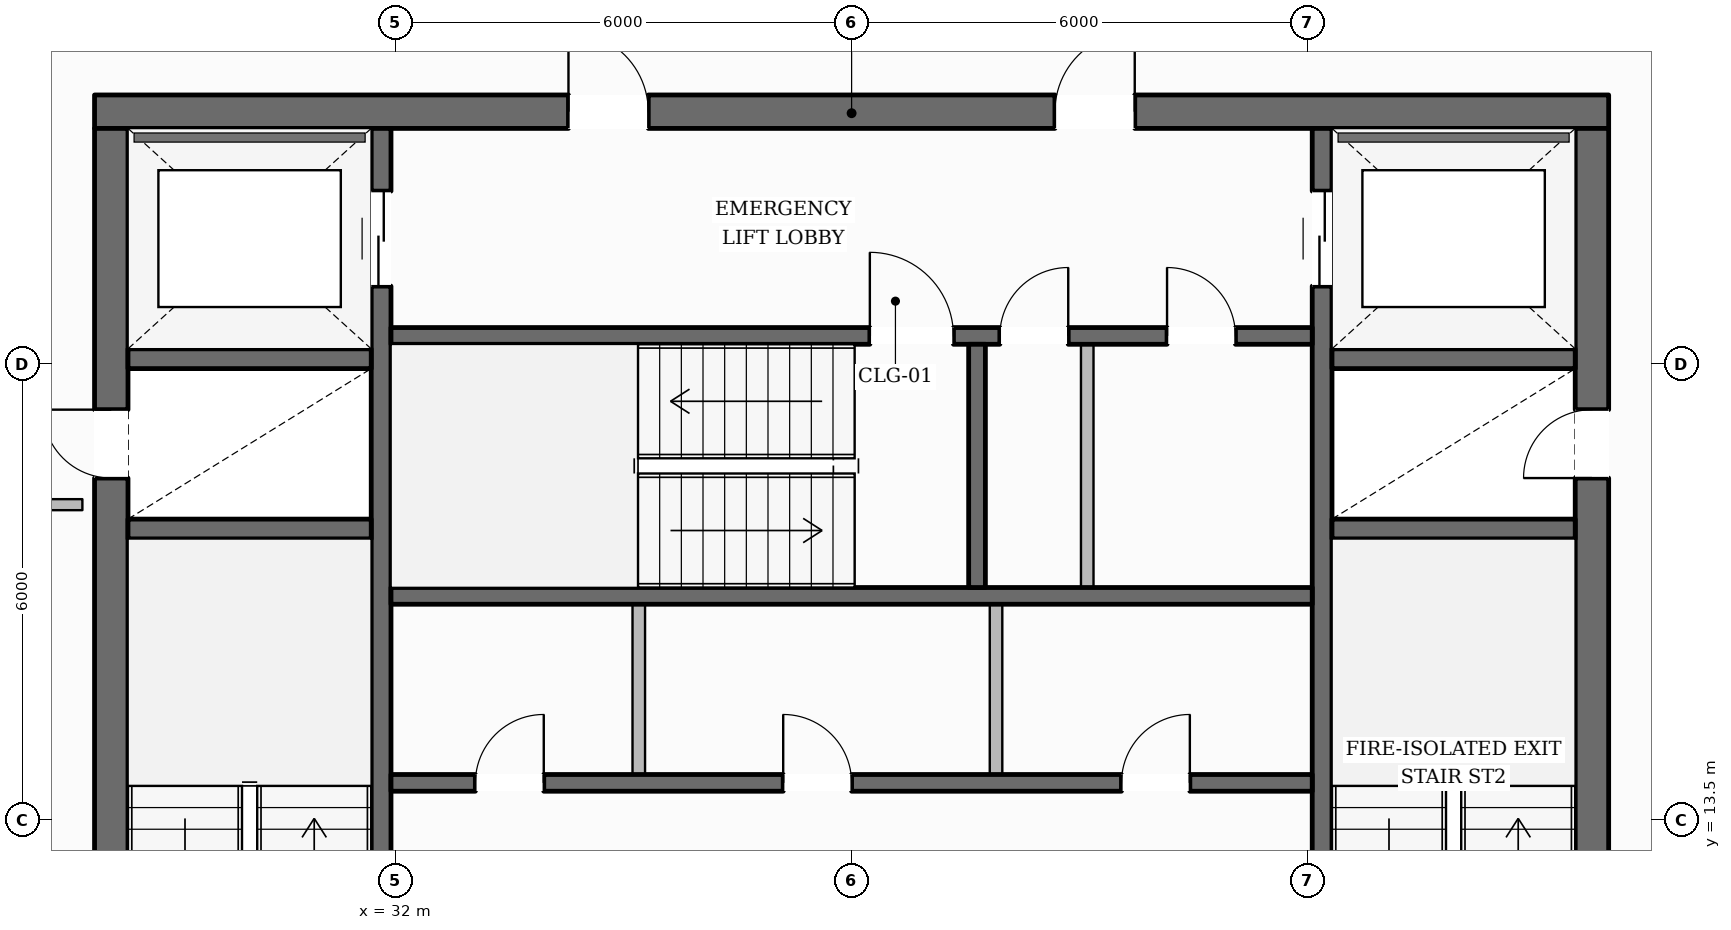
"""IFC4 building model, lengths in metres.
Left out: names, types, materials, properties, quantities, classifications, styles, units other than length and angle.
Written with IfcOpenShell. Run it as: python <this file> out.ifc"""

import sys

from ifc_helpers import new_model, si_unit, direction, frame, frame_2d, origin, place, context, subcontext, project, spatial, rectangle, extrude, element, fill, save


model = new_model("IFC4")
c1 = context("Model", 3, precision=1e-05, world=origin(), true_north=direction((0.0, 1.0)))
c2 = subcontext(c1, "Body", "Model", "MODEL_VIEW")
j1 = project(units=[si_unit("LENGTHUNIT", "METRE"), si_unit("PLANEANGLEUNIT", "RADIAN")], contexts=[c1])
p1 = place(None, origin())
s1 = spatial("IfcSite", under=j1, at=p1, CompositionType="ELEMENT")
p2 = place(p1, origin())
s2 = spatial("IfcBuilding", under=s1, at=p2, CompositionType="ELEMENT")
p3 = place(p2, frame((0.0, 0.0, 172.7)))
s3 = spatial("IfcBuildingStorey", under=s2, at=p3, CompositionType="ELEMENT", Elevation=172.7)
p4 = place(p3, frame((28.04, 22.82, 0.0), z_axis=(0.0, 0.0, 1.0), x_axis=(1.0, 0.0, 0.0)))
e1 = element("IfcWall", 1, at=p4, inside=s3, PredefinedType="SOLIDWALL", context=c2, shape_type="SweptSolid", body=[
    extrude(rectangle(XDim=19.92, YDim=0.44, at=frame_2d((9.96, 0.0))), origin(), (0.0, 0.0, 1.0), 3.6),
])
p5 = place(p4, frame((6.235, 0.0, 0.0)))
e2 = element("IfcOpeningElement", 2, at=p5, cuts=e1, PredefinedType="OPENING", context=c2, shape_type="SweptSolid", body=[
    extrude(rectangle(XDim=1.05, YDim=2.15, at=frame_2d((0.525, 1.075))), frame((0.0, 0.23, 0.0), z_axis=(0.0, -1.0, 0.0), x_axis=(1.0, 0.0, 0.0)), (0.0, 0.0, 1.0), 0.46),
])
p6 = place(p4, frame((12.635, 0.0, 0.0)))
e3 = element("IfcOpeningElement", 3, at=p6, cuts=e1, PredefinedType="OPENING", context=c2, shape_type="SweptSolid", body=[
    extrude(rectangle(XDim=1.05, YDim=2.15, at=frame_2d((0.525, 1.075))), frame((0.0, 0.23, 0.0), z_axis=(0.0, -1.0, 0.0), x_axis=(1.0, 0.0, 0.0)), (0.0, 0.0, 1.0), 0.46),
])
p7 = place(p3, frame((28.26, 9.6, 0.0), z_axis=(0.0, 0.0, 1.0), x_axis=(0.0, 1.0, 0.0)))
e4 = element("IfcWall", 4, at=p7, inside=s3, PredefinedType="SOLIDWALL", context=c2, shape_type="SweptSolid", body=[
    extrude(rectangle(XDim=13.0, YDim=0.44, at=frame_2d((6.5, 0.0))), origin(), (0.0, 0.0, 1.0), 3.6),
])
p8 = place(p7, frame((0.2, 0.0, 0.0)))
e5 = element("IfcOpeningElement", 5, at=p8, cuts=e4, PredefinedType="OPENING", context=c2, shape_type="SweptSolid", body=[
    extrude(rectangle(XDim=1.1, YDim=2.15, at=frame_2d((0.55, 1.075))), frame((0.0, 0.23, 0.0), z_axis=(0.0, -1.0, 0.0), x_axis=(1.0, 0.0, 0.0)), (0.0, 0.0, 1.0), 0.46),
])
p9 = place(p7, frame((8.4, 0.0, 0.0)))
e6 = element("IfcOpeningElement", 6, at=p9, cuts=e4, PredefinedType="OPENING", context=c2, shape_type="SweptSolid", body=[
    extrude(rectangle(XDim=0.9, YDim=2.1, at=frame_2d((0.45, 1.05))), frame((0.0, 0.23, 0.0), z_axis=(0.0, -1.0, 0.0), x_axis=(1.0, 0.0, 0.0)), (0.0, 0.0, 1.0), 0.46),
])
p10 = place(p3, frame((47.74, 9.6, 0.0), z_axis=(0.0, 0.0, 1.0), x_axis=(0.0, 1.0, 0.0)))
e7 = element("IfcWall", 7, at=p10, inside=s3, PredefinedType="SOLIDWALL", context=c2, shape_type="SweptSolid", body=[
    extrude(rectangle(XDim=13.0, YDim=0.44, at=frame_2d((6.5, 0.0))), origin(), (0.0, 0.0, 1.0), 3.6),
])
p11 = place(p10, frame((0.2, 0.0, 0.0)))
e8 = element("IfcOpeningElement", 8, at=p11, cuts=e7, PredefinedType="OPENING", context=c2, shape_type="SweptSolid", body=[
    extrude(rectangle(XDim=1.1, YDim=2.15, at=frame_2d((0.55, 1.075))), frame((0.0, 0.23, 0.0), z_axis=(0.0, -1.0, 0.0), x_axis=(1.0, 0.0, 0.0)), (0.0, 0.0, 1.0), 0.46),
])
p12 = place(p10, frame((8.4, 0.0, 0.0)))
e9 = element("IfcOpeningElement", 9, at=p12, cuts=e7, PredefinedType="OPENING", context=c2, shape_type="SweptSolid", body=[
    extrude(rectangle(XDim=0.9, YDim=2.1, at=frame_2d((0.45, 1.05))), frame((0.0, 0.23, 0.0), z_axis=(0.0, -1.0, 0.0), x_axis=(1.0, 0.0, 0.0)), (0.0, 0.0, 1.0), 0.46),
])
p13 = place(p3, frame((31.81, 9.6, 0.0), z_axis=(0.0, 0.0, 1.0), x_axis=(0.0, 1.0, 0.0)))
e10 = element("IfcWall", 10, at=p13, inside=s3, PredefinedType="SHEAR", context=c2, shape_type="SweptSolid", body=[
    extrude(rectangle(XDim=13.0, YDim=0.26, at=frame_2d((6.5, 0.0))), origin(), (0.0, 0.0, 1.0), 3.6),
])
p14 = place(p13, frame((10.925, 0.0, 0.0)))
e11 = element("IfcOpeningElement", 11, at=p14, cuts=e10, PredefinedType="OPENING", context=c2, shape_type="SweptSolid", body=[
    extrude(rectangle(XDim=1.25, YDim=2.25, at=frame_2d((0.625, 1.125))), frame((0.0, 0.14, 0.0), z_axis=(0.0, -1.0, 0.0), x_axis=(1.0, 0.0, 0.0)), (0.0, 0.0, 1.0), 0.28),
])
p15 = place(p3, frame((44.19, 9.6, 0.0), z_axis=(0.0, 0.0, 1.0), x_axis=(0.0, 1.0, 0.0)))
e12 = element("IfcWall", 12, at=p15, inside=s3, PredefinedType="SHEAR", context=c2, shape_type="SweptSolid", body=[
    extrude(rectangle(XDim=13.0, YDim=0.26, at=frame_2d((6.5, 0.0))), origin(), (0.0, 0.0, 1.0), 3.6),
])
p16 = place(p15, frame((10.925, 0.0, 0.0)))
e13 = element("IfcOpeningElement", 13, at=p16, cuts=e12, PredefinedType="OPENING", context=c2, shape_type="SweptSolid", body=[
    extrude(rectangle(XDim=1.25, YDim=2.25, at=frame_2d((0.625, 1.125))), frame((0.0, 0.14, 0.0), z_axis=(0.0, -1.0, 0.0), x_axis=(1.0, 0.0, 0.0)), (0.0, 0.0, 1.0), 0.28),
])
for number, where, z_axis, x_axis in (
    (14, (28.48, 17.33, 0.0), (0.0, 0.0, 1.0), (1.0, 0.0, 0.0)),
    (15, (28.48, 19.57, 0.0), (0.0, 0.0, 1.0), (1.0, 0.0, 0.0)),
    (16, (44.32, 17.33, 0.0), (0.0, 0.0, 1.0), (1.0, 0.0, 0.0)),
    (17, (44.32, 19.57, 0.0), (0.0, 0.0, 1.0), (1.0, 0.0, 0.0)),
):
    element("IfcWall", number, at=place(p3, frame(where, z_axis=z_axis, x_axis=x_axis)), inside=s3, PredefinedType="SHEAR", context=c2, shape_type="SweptSolid", body=[
        extrude(rectangle(XDim=3.2, YDim=0.26, at=frame_2d((1.6, 0.0))), origin(), (0.0, 0.0, 1.0), 3.6),
    ])
p17 = place(p3, frame((31.94, 19.87, 0.0), z_axis=(0.0, 0.0, 1.0), x_axis=(1.0, 0.0, 0.0)))
e18 = element("IfcWall", 18, at=p17, inside=s3, PredefinedType="SOLIDWALL", context=c2, shape_type="SweptSolid", body=[
    extrude(rectangle(XDim=12.12, YDim=0.22, at=frame_2d((6.06, 0.0))), origin(), (0.0, 0.0, 1.0), 3.6),
])
p18 = place(p17, frame((6.3, 0.0, 0.0)))
e19 = element("IfcOpeningElement", 19, at=p18, cuts=e18, PredefinedType="OPENING", context=c2, shape_type="SweptSolid", body=[
    extrude(rectangle(XDim=1.1, YDim=2.15, at=frame_2d((0.55, 1.075))), frame((0.0, 0.12, 0.0), z_axis=(0.0, -1.0, 0.0), x_axis=(1.0, 0.0, 0.0)), (0.0, 0.0, 1.0), 0.24),
])
p19 = place(p17, frame((8.01, 0.0, 0.0)))
e20 = element("IfcOpeningElement", 20, at=p19, cuts=e18, PredefinedType="OPENING", context=c2, shape_type="SweptSolid", body=[
    extrude(rectangle(XDim=0.9, YDim=2.1, at=frame_2d((0.45, 1.05))), frame((0.0, 0.12, 0.0), z_axis=(0.0, -1.0, 0.0), x_axis=(1.0, 0.0, 0.0)), (0.0, 0.0, 1.0), 0.24),
])
p20 = place(p17, frame((10.21, 0.0, 0.0)))
e21 = element("IfcOpeningElement", 21, at=p20, cuts=e18, PredefinedType="OPENING", context=c2, shape_type="SweptSolid", body=[
    extrude(rectangle(XDim=0.9, YDim=2.1, at=frame_2d((0.45, 1.05))), frame((0.0, 0.12, 0.0), z_axis=(0.0, -1.0, 0.0), x_axis=(1.0, 0.0, 0.0)), (0.0, 0.0, 1.0), 0.24),
])
p21 = place(p3, frame((31.94, 16.45, 0.0), z_axis=(0.0, 0.0, 1.0), x_axis=(1.0, 0.0, 0.0)))
e22 = element("IfcWall", 22, at=p21, inside=s3, PredefinedType="SOLIDWALL", context=c2, shape_type="SweptSolid", body=[
    extrude(rectangle(XDim=12.12, YDim=0.22, at=frame_2d((6.06, 0.0))), origin(), (0.0, 0.0, 1.0), 3.6),
])
p22 = place(p3, frame((39.65, 16.56, 0.0), z_axis=(0.0, 0.0, 1.0), x_axis=(0.0, 1.0, 0.0)))
e23 = element("IfcWall", 23, at=p22, inside=s3, PredefinedType="SOLIDWALL", context=c2, shape_type="SweptSolid", body=[
    extrude(rectangle(XDim=3.2, YDim=0.22, at=frame_2d((1.6, 0.0))), origin(), (0.0, 0.0, 1.0), 3.6),
])
p23 = place(p3, frame((31.94, 13.99, 0.0), z_axis=(0.0, 0.0, 1.0), x_axis=(1.0, 0.0, 0.0)))
e24 = element("IfcWall", 24, at=p23, inside=s3, PredefinedType="SOLIDWALL", context=c2, shape_type="SweptSolid", body=[
    extrude(rectangle(XDim=12.12, YDim=0.22, at=frame_2d((6.06, 0.0))), origin(), (0.0, 0.0, 1.0), 3.6),
])
p24 = place(p23, frame((1.11, 0.0, 0.0)))
e25 = element("IfcOpeningElement", 25, at=p24, cuts=e24, PredefinedType="OPENING", context=c2, shape_type="SweptSolid", body=[
    extrude(rectangle(XDim=0.9, YDim=2.1, at=frame_2d((0.45, 1.05))), frame((0.0, 0.12, 0.0), z_axis=(0.0, -1.0, 0.0), x_axis=(1.0, 0.0, 0.0)), (0.0, 0.0, 1.0), 0.24),
])
p25 = place(p23, frame((5.16, 0.0, 0.0)))
e26 = element("IfcOpeningElement", 26, at=p25, cuts=e24, PredefinedType="OPENING", context=c2, shape_type="SweptSolid", body=[
    extrude(rectangle(XDim=0.9, YDim=2.1, at=frame_2d((0.45, 1.05))), frame((0.0, 0.12, 0.0), z_axis=(0.0, -1.0, 0.0), x_axis=(1.0, 0.0, 0.0)), (0.0, 0.0, 1.0), 0.24),
])
p26 = place(p23, frame((9.61, 0.0, 0.0)))
e27 = element("IfcOpeningElement", 27, at=p26, cuts=e24, PredefinedType="OPENING", context=c2, shape_type="SweptSolid", body=[
    extrude(rectangle(XDim=0.9, YDim=2.1, at=frame_2d((0.45, 1.05))), frame((0.0, 0.12, 0.0), z_axis=(0.0, -1.0, 0.0), x_axis=(1.0, 0.0, 0.0)), (0.0, 0.0, 1.0), 0.24),
])
p27 = place(p3, frame((15.132, 12.224, 0.0), z_axis=(0.0, 0.0, 1.0), x_axis=(0.492438100446, 0.870347469249, 0.0)))
e28 = element("IfcWall", 28, at=p27, inside=s3, PredefinedType="STANDARD", context=c2, shape_type="SweptSolid", body=[
    extrude(rectangle(XDim=37.194, YDim=0.35, at=frame_2d((18.597, 0.0))), origin(), (0.0, 0.0, 1.0), 3.132),
])
p28 = place(p27, frame((32.967, 0.0, 0.65)))
e29 = element("IfcOpeningElement", 29, at=p28, cuts=e28, PredefinedType="OPENING", context=c2, shape_type="SweptSolid", body=[
    extrude(rectangle(XDim=1.45, YDim=1.75, at=frame_2d((0.725, 0.875))), frame((0.0, 0.185, 0.0), z_axis=(0.0, -1.0, 0.0), x_axis=(1.0, 0.0, 0.0)), (0.0, 0.0, 1.0), 0.37),
])
p29 = place(p27, frame((26.927, 0.0, 0.65)))
e30 = element("IfcOpeningElement", 30, at=p29, cuts=e28, PredefinedType="OPENING", context=c2, shape_type="SweptSolid", body=[
    extrude(rectangle(XDim=1.45, YDim=1.75, at=frame_2d((0.725, 0.875))), frame((0.0, 0.185, 0.0), z_axis=(0.0, -1.0, 0.0), x_axis=(1.0, 0.0, 0.0)), (0.0, 0.0, 1.0), 0.37),
])
p30 = place(p27, frame((14.848, 0.0, 0.65)))
e31 = element("IfcOpeningElement", 31, at=p30, cuts=e28, PredefinedType="OPENING", context=c2, shape_type="SweptSolid", body=[
    extrude(rectangle(XDim=1.45, YDim=1.75, at=frame_2d((0.725, 0.875))), frame((0.0, 0.185, 0.0), z_axis=(0.0, -1.0, 0.0), x_axis=(1.0, 0.0, 0.0)), (0.0, 0.0, 1.0), 0.37),
])
p31 = place(p27, frame((8.808, 0.0, 0.65)))
e32 = element("IfcOpeningElement", 32, at=p31, cuts=e28, PredefinedType="OPENING", context=c2, shape_type="SweptSolid", body=[
    extrude(rectangle(XDim=1.45, YDim=1.75, at=frame_2d((0.725, 0.875))), frame((0.0, 0.185, 0.0), z_axis=(0.0, -1.0, 0.0), x_axis=(1.0, 0.0, 0.0)), (0.0, 0.0, 1.0), 0.37),
])
p32 = place(p27, frame((2.769, 0.0, 0.65)))
e33 = element("IfcOpeningElement", 33, at=p32, cuts=e28, PredefinedType="OPENING", context=c2, shape_type="SweptSolid", body=[
    extrude(rectangle(XDim=1.45, YDim=1.75, at=frame_2d((0.725, 0.875))), frame((0.0, 0.185, 0.0), z_axis=(0.0, -1.0, 0.0), x_axis=(1.0, 0.0, 0.0)), (0.0, 0.0, 1.0), 0.37),
])
p33 = place(p3, frame((42.661, 44.531, 0.0), z_axis=(0.0, 0.0, 1.0), x_axis=(0.497996481168, -0.867179049991, 0.0)))
e34 = element("IfcWall", 34, at=p33, inside=s3, PredefinedType="STANDARD", context=c2, shape_type="SweptSolid", body=[
    extrude(rectangle(XDim=37.599, YDim=0.35, at=frame_2d((18.799, 0.0))), origin(), (0.0, 0.0, 1.0), 3.132),
])
p34 = place(p33, frame((33.346, 0.0, 0.65)))
e35 = element("IfcOpeningElement", 35, at=p34, cuts=e34, PredefinedType="OPENING", context=c2, shape_type="SweptSolid", body=[
    extrude(rectangle(XDim=1.45, YDim=1.75, at=frame_2d((0.725, 0.875))), frame((0.0, 0.185, 0.0), z_axis=(0.0, -1.0, 0.0), x_axis=(1.0, 0.0, 0.0)), (0.0, 0.0, 1.0), 0.37),
])
p35 = place(p33, frame((27.238, 0.0, 0.65)))
e36 = element("IfcOpeningElement", 36, at=p35, cuts=e34, PredefinedType="OPENING", context=c2, shape_type="SweptSolid", body=[
    extrude(rectangle(XDim=1.45, YDim=1.75, at=frame_2d((0.725, 0.875))), frame((0.0, 0.185, 0.0), z_axis=(0.0, -1.0, 0.0), x_axis=(1.0, 0.0, 0.0)), (0.0, 0.0, 1.0), 0.37),
])
p36 = place(p33, frame((15.021, 0.0, 0.65)))
e37 = element("IfcOpeningElement", 37, at=p36, cuts=e34, PredefinedType="OPENING", context=c2, shape_type="SweptSolid", body=[
    extrude(rectangle(XDim=1.45, YDim=1.75, at=frame_2d((0.725, 0.875))), frame((0.0, 0.185, 0.0), z_axis=(0.0, -1.0, 0.0), x_axis=(1.0, 0.0, 0.0)), (0.0, 0.0, 1.0), 0.37),
])
p37 = place(p33, frame((8.913, 0.0, 0.65)))
e38 = element("IfcOpeningElement", 38, at=p37, cuts=e34, PredefinedType="OPENING", context=c2, shape_type="SweptSolid", body=[
    extrude(rectangle(XDim=1.45, YDim=1.75, at=frame_2d((0.725, 0.875))), frame((0.0, 0.185, 0.0), z_axis=(0.0, -1.0, 0.0), x_axis=(1.0, 0.0, 0.0)), (0.0, 0.0, 1.0), 0.37),
])
p38 = place(p33, frame((2.805, 0.0, 0.65)))
e39 = element("IfcOpeningElement", 39, at=p38, cuts=e34, PredefinedType="OPENING", context=c2, shape_type="SweptSolid", body=[
    extrude(rectangle(XDim=1.45, YDim=1.75, at=frame_2d((0.725, 0.875))), frame((0.0, 0.185, 0.0), z_axis=(0.0, -1.0, 0.0), x_axis=(1.0, 0.0, 0.0)), (0.0, 0.0, 1.0), 0.37),
])
for number, where, z_axis, x_axis in (
    (40, (35.2, 14.1, 0.0), (0.0, 0.0, 1.0), (0.0, 1.0, 0.0)),
    (41, (39.9, 14.1, 0.0), (0.0, 0.0, 1.0), (0.0, 1.0, 0.0)),
):
    element("IfcWall", number, at=place(p3, frame(where, z_axis=z_axis, x_axis=x_axis)), inside=s3, PredefinedType="PARTITIONING", context=c2, shape_type="SweptSolid", body=[
        extrude(rectangle(XDim=2.24, YDim=0.165, at=frame_2d((1.12, 0.0))), origin(), (0.0, 0.0, 1.0), 3.6),
    ])
p39 = place(p3, frame((41.1, 16.56, 0.0), z_axis=(0.0, 0.0, 1.0), x_axis=(0.0, 1.0, 0.0)))
e42 = element("IfcWall", 42, at=p39, inside=s3, PredefinedType="PARTITIONING", context=c2, shape_type="SweptSolid", body=[
    extrude(rectangle(XDim=3.2, YDim=0.165, at=frame_2d((1.6, 0.0))), origin(), (0.0, 0.0, 1.0), 3.6),
])
p40 = place(p3, frame((27.88, 17.65, 0.0), z_axis=(0.0, 0.0, 1.0), x_axis=(-1.0, 0.0, 0.0)))
e43 = element("IfcWall", 43, at=p40, inside=s3, PredefinedType="PARTITIONING", context=c2, shape_type="SweptSolid", body=[
    extrude(rectangle(XDim=1.82, YDim=0.145, at=frame_2d((0.91, 0.0))), origin(), (0.0, 0.0, 1.0), 3.141),
])
p41 = place(p18, origin())
e44 = element("IfcDoor", 44, at=p41, inside=s3, OperationType="SINGLE_SWING_LEFT", PredefinedType="DOOR", context=c2, shape_type="SweptSolid", body=[
    extrude(rectangle(XDim=1.1, YDim=2.15, at=frame_2d((0.55, 1.075))), frame((0.0, 0.025, 0.0), z_axis=(0.0, -1.0, 0.0), x_axis=(1.0, 0.0, 0.0)), (0.0, 0.0, 1.0), 0.05),
])
fill(e19, e44)
p42 = place(p9, origin())
e45 = element("IfcDoor", 45, at=p42, inside=s3, OperationType="SINGLE_SWING_RIGHT", PredefinedType="DOOR", context=c2, shape_type="SweptSolid", body=[
    extrude(rectangle(XDim=0.9, YDim=2.1, at=frame_2d((0.45, 1.05))), frame((0.0, 0.025, 0.0), z_axis=(0.0, -1.0, 0.0), x_axis=(1.0, 0.0, 0.0)), (0.0, 0.0, 1.0), 0.05),
])
fill(e6, e45)
p43 = place(p12, origin())
e46 = element("IfcDoor", 46, at=p43, inside=s3, OperationType="SINGLE_SWING_LEFT", PredefinedType="DOOR", context=c2, shape_type="SweptSolid", body=[
    extrude(rectangle(XDim=0.9, YDim=2.1, at=frame_2d((0.45, 1.05))), frame((0.0, 0.025, 0.0), z_axis=(0.0, -1.0, 0.0), x_axis=(1.0, 0.0, 0.0)), (0.0, 0.0, 1.0), 0.05),
])
fill(e9, e46)
p44 = place(p5, origin())
e47 = element("IfcDoor", 47, at=p44, inside=s3, OperationType="SINGLE_SWING_LEFT", PredefinedType="DOOR", context=c2, shape_type="SweptSolid", body=[
    extrude(rectangle(XDim=1.05, YDim=2.15, at=frame_2d((0.525, 1.075))), frame((0.0, 0.025, 0.0), z_axis=(0.0, -1.0, 0.0), x_axis=(1.0, 0.0, 0.0)), (0.0, 0.0, 1.0), 0.05),
])
fill(e2, e47)
p45 = place(p6, origin())
e48 = element("IfcDoor", 48, at=p45, inside=s3, OperationType="SINGLE_SWING_RIGHT", PredefinedType="DOOR", context=c2, shape_type="SweptSolid", body=[
    extrude(rectangle(XDim=1.05, YDim=2.15, at=frame_2d((0.525, 1.075))), frame((0.0, 0.025, 0.0), z_axis=(0.0, -1.0, 0.0), x_axis=(1.0, 0.0, 0.0)), (0.0, 0.0, 1.0), 0.05),
])
fill(e3, e48)
p46 = place(p14, origin())
e49 = element("IfcDoor", 49, at=p46, inside=s3, OperationType="DOUBLE_DOOR_SLIDING", PredefinedType="DOOR", context=c2, shape_type="SweptSolid", body=[
    extrude(rectangle(XDim=1.25, YDim=2.25, at=frame_2d((0.625, 1.125))), frame((0.0, 0.025, 0.0), z_axis=(0.0, -1.0, 0.0), x_axis=(1.0, 0.0, 0.0)), (0.0, 0.0, 1.0), 0.05),
])
fill(e11, e49)
p47 = place(p16, origin())
e50 = element("IfcDoor", 50, at=p47, inside=s3, OperationType="DOUBLE_DOOR_SLIDING", PredefinedType="DOOR", context=c2, shape_type="SweptSolid", body=[
    extrude(rectangle(XDim=1.25, YDim=2.25, at=frame_2d((0.625, 1.125))), frame((0.0, 0.025, 0.0), z_axis=(0.0, -1.0, 0.0), x_axis=(1.0, 0.0, 0.0)), (0.0, 0.0, 1.0), 0.05),
])
fill(e13, e50)
p48 = place(p24, origin())
e51 = element("IfcDoor", 51, at=p48, inside=s3, OperationType="SINGLE_SWING_RIGHT", PredefinedType="DOOR", context=c2, shape_type="SweptSolid", body=[
    extrude(rectangle(XDim=0.9, YDim=2.1, at=frame_2d((0.45, 1.05))), frame((0.0, 0.025, 0.0), z_axis=(0.0, -1.0, 0.0), x_axis=(1.0, 0.0, 0.0)), (0.0, 0.0, 1.0), 0.05),
])
fill(e25, e51)
p49 = place(p25, origin())
e52 = element("IfcDoor", 52, at=p49, inside=s3, OperationType="SINGLE_SWING_LEFT", PredefinedType="DOOR", context=c2, shape_type="SweptSolid", body=[
    extrude(rectangle(XDim=0.9, YDim=2.1, at=frame_2d((0.45, 1.05))), frame((0.0, 0.025, 0.0), z_axis=(0.0, -1.0, 0.0), x_axis=(1.0, 0.0, 0.0)), (0.0, 0.0, 1.0), 0.05),
])
fill(e26, e52)
p50 = place(p26, origin())
e53 = element("IfcDoor", 53, at=p50, inside=s3, OperationType="SINGLE_SWING_RIGHT", PredefinedType="DOOR", context=c2, shape_type="SweptSolid", body=[
    extrude(rectangle(XDim=0.9, YDim=2.1, at=frame_2d((0.45, 1.05))), frame((0.0, 0.025, 0.0), z_axis=(0.0, -1.0, 0.0), x_axis=(1.0, 0.0, 0.0)), (0.0, 0.0, 1.0), 0.05),
])
fill(e27, e53)
p51 = place(p19, origin())
e54 = element("IfcDoor", 54, at=p51, inside=s3, OperationType="SINGLE_SWING_RIGHT", PredefinedType="DOOR", context=c2, shape_type="SweptSolid", body=[
    extrude(rectangle(XDim=0.9, YDim=2.1, at=frame_2d((0.45, 1.05))), frame((0.0, 0.025, 0.0), z_axis=(0.0, -1.0, 0.0), x_axis=(1.0, 0.0, 0.0)), (0.0, 0.0, 1.0), 0.05),
])
fill(e20, e54)
p52 = place(p20, origin())
e55 = element("IfcDoor", 55, at=p52, inside=s3, OperationType="SINGLE_SWING_LEFT", PredefinedType="DOOR", context=c2, shape_type="SweptSolid", body=[
    extrude(rectangle(XDim=0.9, YDim=2.1, at=frame_2d((0.45, 1.05))), frame((0.0, 0.025, 0.0), z_axis=(0.0, -1.0, 0.0), x_axis=(1.0, 0.0, 0.0)), (0.0, 0.0, 1.0), 0.05),
])
fill(e21, e55)
save(model, sys.argv[1])
